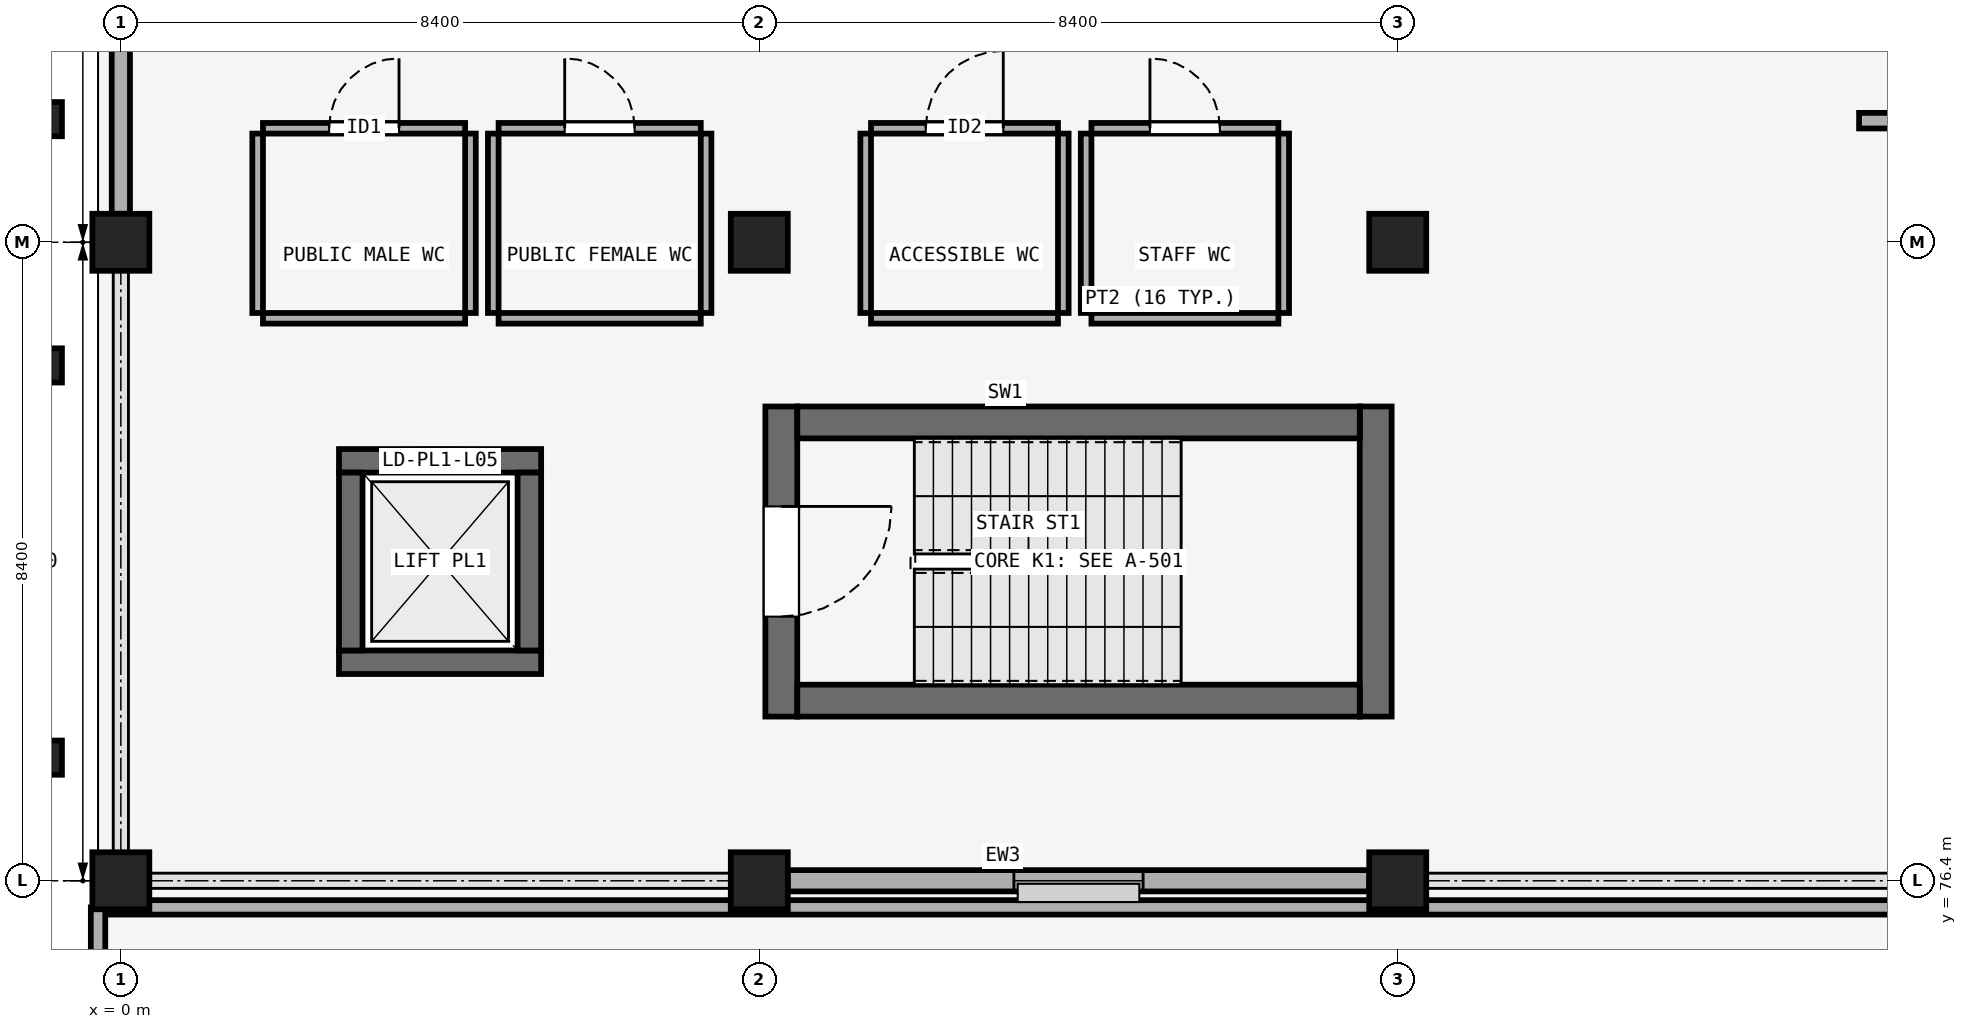
"""IFC4 building model, lengths in metres.
Left out: names, types, materials, properties, quantities, classifications, styles, units other than length and angle.
Written with IfcOpenShell. Run it as: python <this file> out.ifc"""

import sys

from ifc_helpers import new_model, si_unit, direction, frame, frame_2d, origin, origin_2d, place, context, subcontext, project, spatial, rectangle, extrude, element, fill, save


model = new_model("IFC4")
c1 = context("Model", 3, precision=1e-05, world=origin(), true_north=direction((0.0, 1.0)))
c2 = subcontext(c1, "Body", "Model", "MODEL_VIEW")
j1 = project(units=[si_unit("LENGTHUNIT", "METRE"), si_unit("PLANEANGLEUNIT", "RADIAN")], contexts=[c1])
p1 = place(None, origin())
s1 = spatial("IfcSite", under=j1, at=p1, CompositionType="ELEMENT")
p2 = place(p1, origin())
s2 = spatial("IfcBuilding", under=s1, at=p2, CompositionType="ELEMENT")
p3 = place(p2, frame((0.0, 0.0, 23.4)))
s3 = spatial("IfcBuildingStorey", under=s2, at=p3, CompositionType="ELEMENT", Elevation=23.4)
for number, where, z_axis, x_axis in (
    (1, (0.0, 76.4, 0.0), (0.0, 0.0, 1.0), (1.0, 0.0, 0.0)),
    (2, (8.4, 76.4, 0.0), (0.0, 0.0, 1.0), (1.0, 0.0, 0.0)),
    (3, (16.8, 76.4, 0.0), (0.0, 0.0, 1.0), (1.0, 0.0, 0.0)),
    (4, (0.0, 84.8, 0.0), (0.0, 0.0, 1.0), (1.0, 0.0, 0.0)),
    (5, (8.4, 84.8, 0.0), (0.0, 0.0, 1.0), (1.0, 0.0, 0.0)),
    (6, (16.8, 84.8, 0.0), (0.0, 0.0, 1.0), (1.0, 0.0, 0.0)),
):
    element("IfcColumn", number, at=place(p3, frame(where, z_axis=z_axis, x_axis=x_axis)), inside=s3, PredefinedType="COLUMN", context=c2, shape_type="SweptSolid", body=[
        extrude(rectangle(XDim=0.75, YDim=0.75, at=origin_2d()), origin(), (0.0, 0.0, 1.0), 4.5),
    ])
for number, where, z_axis, x_axis in (
    (7, (-1.05, 78.02, 0.0), (0.0, 0.0, 1.0), (0.0, 1.0, 0.0)),
    (8, (-1.05, 83.18, 0.0), (0.0, 0.0, 1.0), (0.0, 1.0, 0.0)),
    (9, (-1.05, 86.42, 0.0), (0.0, 0.0, 1.0), (0.0, 1.0, 0.0)),
):
    element("IfcColumn", number, at=place(p3, frame(where, z_axis=z_axis, x_axis=x_axis)), inside=s3, PredefinedType="PILASTER", context=c2, shape_type="SweptSolid", body=[
        extrude(rectangle(XDim=0.45, YDim=0.55, at=origin_2d()), origin(), (0.0, 0.0, 1.0), 4.5),
    ])
p4 = place(p3, frame((8.775, 76.4, 0.0), z_axis=(0.0, 0.0, 1.0), x_axis=(1.0, 0.0, 0.0)))
e10 = element("IfcWall", 10, at=p4, inside=s3, PredefinedType="SOLIDWALL", context=c2, shape_type="SweptSolid", body=[
    extrude(rectangle(XDim=7.65, YDim=0.28, at=frame_2d((3.825, 0.0))), origin(), (0.0, 0.0, 1.0), 3.45),
])
p5 = place(p4, frame((2.975, 0.0, 0.95)))
e11 = element("IfcOpeningElement", 11, at=p5, cuts=e10, PredefinedType="OPENING", context=c2, shape_type="SweptSolid", body=[
    extrude(rectangle(XDim=1.7, YDim=1.6, at=frame_2d((0.85, 0.8))), frame((0.0, 0.15, 0.0), z_axis=(0.0, -1.0, 0.0), x_axis=(1.0, 0.0, 0.0)), (0.0, 0.0, 1.0), 0.3),
])
p6 = place(p3, frame((0.0, 85.175, 0.0), z_axis=(0.0, 0.0, 1.0), x_axis=(0.0, 1.0, 0.0)))
e12 = element("IfcWall", 12, at=p6, inside=s3, PredefinedType="SOLIDWALL", context=c2, shape_type="SweptSolid", body=[
    extrude(rectangle(XDim=7.65, YDim=0.24, at=frame_2d((3.825, 0.0))), origin(), (0.0, 0.0, 1.0), 3.45),
])
p7 = place(p6, frame((2.9, 0.0, 0.95)))
e13 = element("IfcOpeningElement", 13, at=p7, cuts=e12, PredefinedType="OPENING", context=c2, shape_type="SweptSolid", body=[
    extrude(rectangle(XDim=1.85, YDim=1.85, at=frame_2d((0.925, 0.925))), frame((0.0, 0.13, 0.0), z_axis=(0.0, -1.0, 0.0), x_axis=(1.0, 0.0, 0.0)), (0.0, 0.0, 1.0), 0.26),
])
p8 = place(p3, frame((42.3, 76.05, 0.0), z_axis=(0.0, 0.0, 1.0), x_axis=(-1.0, 0.0, 0.0)))
e14 = element("IfcWall", 14, at=p8, inside=s3, PredefinedType="PARAPET", context=c2, shape_type="SweptSolid", body=[
    extrude(rectangle(XDim=42.6, YDim=0.19, at=frame_2d((21.3, 0.0))), origin(), (0.0, 0.0, 1.0), 0.95),
])
p9 = place(p3, frame((-0.3, 76.05, 0.0), z_axis=(0.0, 0.0, 1.0), x_axis=(0.0, -1.0, 0.0)))
e15 = element("IfcWall", 15, at=p9, inside=s3, PredefinedType="PARAPET", context=c2, shape_type="SweptSolid", body=[
    extrude(rectangle(XDim=8.35, YDim=0.19, at=frame_2d((4.175, 0.0))), origin(), (0.0, 0.0, 1.0), 0.95),
])
p10 = place(p3, frame((8.69, 82.64, 0.0), z_axis=(0.0, 0.0, 1.0), x_axis=(0.0, -1.0, 0.0)))
e16 = element("IfcWall", 16, at=p10, inside=s3, PredefinedType="SHEAR", context=c2, shape_type="SweptSolid", body=[
    extrude(rectangle(XDim=4.08, YDim=0.42, at=frame_2d((2.04, 0.0))), origin(), (0.0, 0.0, 1.0), 4.2),
])
p11 = place(p10, frame((1.315, 0.0, 0.0)))
e17 = element("IfcOpeningElement", 17, at=p11, cuts=e16, PredefinedType="OPENING", context=c2, shape_type="SweptSolid", body=[
    extrude(rectangle(XDim=1.45, YDim=2.2, at=frame_2d((0.725, 1.1))), frame((0.0, 0.22, 0.0), z_axis=(0.0, -1.0, 0.0), x_axis=(1.0, 0.0, 0.0)), (0.0, 0.0, 1.0), 0.44),
])
p12 = place(p3, frame((16.51, 78.56, 0.0), z_axis=(0.0, 0.0, 1.0), x_axis=(0.0, 1.0, 0.0)))
e18 = element("IfcWall", 18, at=p12, inside=s3, PredefinedType="SHEAR", context=c2, shape_type="SweptSolid", body=[
    extrude(rectangle(XDim=4.08, YDim=0.42, at=frame_2d((2.04, 0.0))), origin(), (0.0, 0.0, 1.0), 4.2),
])
for number, where, z_axis, x_axis in (
    (19, (8.9, 78.77, 0.0), (0.0, 0.0, 1.0), (1.0, 0.0, 0.0)),
    (20, (8.9, 82.43, 0.0), (0.0, 0.0, 1.0), (1.0, 0.0, 0.0)),
):
    element("IfcWall", number, at=place(p3, frame(where, z_axis=z_axis, x_axis=x_axis)), inside=s3, PredefinedType="SHEAR", context=c2, shape_type="SweptSolid", body=[
        extrude(rectangle(XDim=7.4, YDim=0.42, at=frame_2d((3.7, 0.0))), origin(), (0.0, 0.0, 1.0), 4.2),
    ])
p13 = place(p3, frame((2.87, 79.275, 0.0), z_axis=(0.0, 0.0, 1.0), x_axis=(1.0, 0.0, 0.0)))
e21 = element("IfcWall", 21, at=p13, inside=s3, PredefinedType="SHEAR", context=c2, shape_type="SweptSolid", body=[
    extrude(rectangle(XDim=2.66, YDim=0.31, at=frame_2d((1.33, 0.0))), origin(), (0.0, 0.0, 1.0), 4.2),
])
p14 = place(p3, frame((2.87, 81.925, 0.0), z_axis=(0.0, 0.0, 1.0), x_axis=(1.0, 0.0, 0.0)))
e22 = element("IfcWall", 22, at=p14, inside=s3, PredefinedType="SHEAR", context=c2, shape_type="SweptSolid", body=[
    extrude(rectangle(XDim=2.66, YDim=0.31, at=frame_2d((1.33, 0.0))), origin(), (0.0, 0.0, 1.0), 4.2),
])
p15 = place(p14, frame((0.78, 0.0, 0.0)))
e23 = element("IfcOpeningElement", 23, at=p15, cuts=e22, PredefinedType="OPENING", context=c2, shape_type="SweptSolid", body=[
    extrude(rectangle(XDim=1.1, YDim=2.2, at=frame_2d((0.55, 1.1))), frame((0.0, 0.165, 0.0), z_axis=(0.0, -1.0, 0.0), x_axis=(1.0, 0.0, 0.0)), (0.0, 0.0, 1.0), 0.33),
])
for number, where, z_axis, x_axis in (
    (24, (3.025, 79.43, 0.0), (0.0, 0.0, 1.0), (0.0, 1.0, 0.0)),
    (25, (5.375, 79.43, 0.0), (0.0, 0.0, 1.0), (0.0, 1.0, 0.0)),
):
    element("IfcWall", number, at=place(p3, frame(where, z_axis=z_axis, x_axis=x_axis)), inside=s3, PredefinedType="SHEAR", context=c2, shape_type="SweptSolid", body=[
        extrude(rectangle(XDim=2.34, YDim=0.31, at=frame_2d((1.17, 0.0))), origin(), (0.0, 0.0, 1.0), 4.2),
    ])
p16 = place(p3, frame((1.87, 86.3, 0.0), z_axis=(0.0, 0.0, 1.0), x_axis=(1.0, 0.0, 0.0)))
e26 = element("IfcWall", 26, at=p16, inside=s3, PredefinedType="PARTITIONING", context=c2, shape_type="SweptSolid", body=[
    extrude(rectangle(XDim=2.66, YDim=0.14, at=frame_2d((1.33, 0.0))), origin(), (0.0, 0.0, 1.0), 4.2),
])
p17 = place(p16, frame((0.87, 0.0, 0.0)))
e27 = element("IfcOpeningElement", 27, at=p17, cuts=e26, PredefinedType="OPENING", context=c2, shape_type="SweptSolid", body=[
    extrude(rectangle(XDim=0.92, YDim=2.12, at=frame_2d((0.46, 1.06))), frame((0.0, 0.08, 0.0), z_axis=(0.0, -1.0, 0.0), x_axis=(1.0, 0.0, 0.0)), (0.0, 0.0, 1.0), 0.16),
])
p18 = place(p3, frame((1.87, 83.8, 0.0), z_axis=(0.0, 0.0, 1.0), x_axis=(1.0, 0.0, 0.0)))
e28 = element("IfcWall", 28, at=p18, inside=s3, PredefinedType="PARTITIONING", context=c2, shape_type="SweptSolid", body=[
    extrude(rectangle(XDim=2.66, YDim=0.14, at=frame_2d((1.33, 0.0))), origin(), (0.0, 0.0, 1.0), 4.2),
])
for number, where, z_axis, x_axis in (
    (29, (1.8, 83.87, 0.0), (0.0, 0.0, 1.0), (0.0, 1.0, 0.0)),
    (30, (4.6, 83.87, 0.0), (0.0, 0.0, 1.0), (0.0, 1.0, 0.0)),
):
    element("IfcWall", number, at=place(p3, frame(where, z_axis=z_axis, x_axis=x_axis)), inside=s3, PredefinedType="PARTITIONING", context=c2, shape_type="SweptSolid", body=[
        extrude(rectangle(XDim=2.36, YDim=0.14, at=frame_2d((1.18, 0.0))), origin(), (0.0, 0.0, 1.0), 3.45),
    ])
p19 = place(p3, frame((4.97, 86.3, 0.0), z_axis=(0.0, 0.0, 1.0), x_axis=(1.0, 0.0, 0.0)))
e31 = element("IfcWall", 31, at=p19, inside=s3, PredefinedType="PARTITIONING", context=c2, shape_type="SweptSolid", body=[
    extrude(rectangle(XDim=2.66, YDim=0.14, at=frame_2d((1.33, 0.0))), origin(), (0.0, 0.0, 1.0), 4.2),
])
p20 = place(p19, frame((0.87, 0.0, 0.0)))
e32 = element("IfcOpeningElement", 32, at=p20, cuts=e31, PredefinedType="OPENING", context=c2, shape_type="SweptSolid", body=[
    extrude(rectangle(XDim=0.92, YDim=2.12, at=frame_2d((0.46, 1.06))), frame((0.0, 0.08, 0.0), z_axis=(0.0, -1.0, 0.0), x_axis=(1.0, 0.0, 0.0)), (0.0, 0.0, 1.0), 0.16),
])
p21 = place(p3, frame((4.97, 83.8, 0.0), z_axis=(0.0, 0.0, 1.0), x_axis=(1.0, 0.0, 0.0)))
e33 = element("IfcWall", 33, at=p21, inside=s3, PredefinedType="PARTITIONING", context=c2, shape_type="SweptSolid", body=[
    extrude(rectangle(XDim=2.66, YDim=0.14, at=frame_2d((1.33, 0.0))), origin(), (0.0, 0.0, 1.0), 4.2),
])
for number, where, z_axis, x_axis in (
    (34, (4.9, 83.87, 0.0), (0.0, 0.0, 1.0), (0.0, 1.0, 0.0)),
    (35, (7.7, 83.87, 0.0), (0.0, 0.0, 1.0), (0.0, 1.0, 0.0)),
):
    element("IfcWall", number, at=place(p3, frame(where, z_axis=z_axis, x_axis=x_axis)), inside=s3, PredefinedType="PARTITIONING", context=c2, shape_type="SweptSolid", body=[
        extrude(rectangle(XDim=2.36, YDim=0.14, at=frame_2d((1.18, 0.0))), origin(), (0.0, 0.0, 1.0), 3.45),
    ])
p22 = place(p3, frame((9.87, 86.3, 0.0), z_axis=(0.0, 0.0, 1.0), x_axis=(1.0, 0.0, 0.0)))
e36 = element("IfcWall", 36, at=p22, inside=s3, PredefinedType="PARTITIONING", context=c2, shape_type="SweptSolid", body=[
    extrude(rectangle(XDim=2.46, YDim=0.14, at=frame_2d((1.23, 0.0))), origin(), (0.0, 0.0, 1.0), 4.2),
])
p23 = place(p22, frame((0.72, 0.0, 0.0)))
e37 = element("IfcOpeningElement", 37, at=p23, cuts=e36, PredefinedType="OPENING", context=c2, shape_type="SweptSolid", body=[
    extrude(rectangle(XDim=1.02, YDim=2.15, at=frame_2d((0.51, 1.075))), frame((0.0, 0.08, 0.0), z_axis=(0.0, -1.0, 0.0), x_axis=(1.0, 0.0, 0.0)), (0.0, 0.0, 1.0), 0.16),
])
p24 = place(p3, frame((9.87, 83.8, 0.0), z_axis=(0.0, 0.0, 1.0), x_axis=(1.0, 0.0, 0.0)))
e38 = element("IfcWall", 38, at=p24, inside=s3, PredefinedType="PARTITIONING", context=c2, shape_type="SweptSolid", body=[
    extrude(rectangle(XDim=2.46, YDim=0.14, at=frame_2d((1.23, 0.0))), origin(), (0.0, 0.0, 1.0), 4.2),
])
for number, where, z_axis, x_axis in (
    (39, (9.8, 83.87, 0.0), (0.0, 0.0, 1.0), (0.0, 1.0, 0.0)),
    (40, (12.4, 83.87, 0.0), (0.0, 0.0, 1.0), (0.0, 1.0, 0.0)),
):
    element("IfcWall", number, at=place(p3, frame(where, z_axis=z_axis, x_axis=x_axis)), inside=s3, PredefinedType="PARTITIONING", context=c2, shape_type="SweptSolid", body=[
        extrude(rectangle(XDim=2.36, YDim=0.14, at=frame_2d((1.18, 0.0))), origin(), (0.0, 0.0, 1.0), 3.45),
    ])
p25 = place(p3, frame((12.77, 86.3, 0.0), z_axis=(0.0, 0.0, 1.0), x_axis=(1.0, 0.0, 0.0)))
e41 = element("IfcWall", 41, at=p25, inside=s3, PredefinedType="PARTITIONING", context=c2, shape_type="SweptSolid", body=[
    extrude(rectangle(XDim=2.46, YDim=0.14, at=frame_2d((1.23, 0.0))), origin(), (0.0, 0.0, 1.0), 4.2),
])
p26 = place(p25, frame((0.77, 0.0, 0.0)))
e42 = element("IfcOpeningElement", 42, at=p26, cuts=e41, PredefinedType="OPENING", context=c2, shape_type="SweptSolid", body=[
    extrude(rectangle(XDim=0.92, YDim=2.12, at=frame_2d((0.46, 1.06))), frame((0.0, 0.08, 0.0), z_axis=(0.0, -1.0, 0.0), x_axis=(1.0, 0.0, 0.0)), (0.0, 0.0, 1.0), 0.16),
])
p27 = place(p3, frame((12.77, 83.8, 0.0), z_axis=(0.0, 0.0, 1.0), x_axis=(1.0, 0.0, 0.0)))
e43 = element("IfcWall", 43, at=p27, inside=s3, PredefinedType="PARTITIONING", context=c2, shape_type="SweptSolid", body=[
    extrude(rectangle(XDim=2.46, YDim=0.14, at=frame_2d((1.23, 0.0))), origin(), (0.0, 0.0, 1.0), 4.2),
])
for number, where, z_axis, x_axis in (
    (44, (12.7, 83.87, 0.0), (0.0, 0.0, 1.0), (0.0, 1.0, 0.0)),
    (45, (15.3, 83.87, 0.0), (0.0, 0.0, 1.0), (0.0, 1.0, 0.0)),
):
    element("IfcWall", number, at=place(p3, frame(where, z_axis=z_axis, x_axis=x_axis)), inside=s3, PredefinedType="PARTITIONING", context=c2, shape_type="SweptSolid", body=[
        extrude(rectangle(XDim=2.36, YDim=0.14, at=frame_2d((1.18, 0.0))), origin(), (0.0, 0.0, 1.0), 3.45),
    ])
p28 = place(p3, frame((22.87, 86.4, 0.0), z_axis=(0.0, 0.0, 1.0), x_axis=(1.0, 0.0, 0.0)))
e46 = element("IfcWall", 46, at=p28, inside=s3, PredefinedType="PARTITIONING", context=c2, shape_type="SweptSolid", body=[
    extrude(rectangle(XDim=6.21, YDim=0.205, at=frame_2d((3.105, 0.0))), origin(), (0.0, 0.0, 1.0), 4.2),
])
p29 = place(p28, frame((3.025, 0.0, 0.0)))
e47 = element("IfcOpeningElement", 47, at=p29, cuts=e46, PredefinedType="OPENING", context=c2, shape_type="SweptSolid", body=[
    extrude(rectangle(XDim=1.36, YDim=2.34, at=frame_2d((0.68, 1.17))), frame((0.0, 0.113, 0.0), z_axis=(0.0, -1.0, 0.0), x_axis=(1.0, 0.0, 0.0)), (0.0, 0.0, 1.0), 0.225),
])
p30 = place(p5, origin())
e48 = element("IfcWindow", 48, at=p30, inside=s3, PartitioningType="DOUBLE_PANEL_VERTICAL", PredefinedType="WINDOW", context=c2, shape_type="SweptSolid", body=[
    extrude(rectangle(XDim=1.7, YDim=1.6, at=frame_2d((0.85, 0.8))), frame((0.0, 0.03, 0.0), z_axis=(0.0, -1.0, 0.0), x_axis=(1.0, 0.0, 0.0)), (0.0, 0.0, 1.0), 0.06),
])
fill(e11, e48)
p31 = place(p11, origin())
e49 = element("IfcDoor", 49, at=p31, inside=s3, OperationType="SINGLE_SWING_LEFT", PredefinedType="DOOR", context=c2, shape_type="SweptSolid", body=[
    extrude(rectangle(XDim=1.45, YDim=2.2, at=frame_2d((0.725, 1.1))), frame((0.0, 0.025, 0.0), z_axis=(0.0, -1.0, 0.0), x_axis=(1.0, 0.0, 0.0)), (0.0, 0.0, 1.0), 0.05),
])
fill(e17, e49)
p32 = place(p15, origin())
e50 = element("IfcDoor", 50, at=p32, inside=s3, OperationType="SLIDING_TO_LEFT", PredefinedType="DOOR", context=c2, shape_type="SweptSolid", body=[
    extrude(rectangle(XDim=1.1, YDim=2.2, at=frame_2d((0.55, 1.1))), frame((0.0, 0.025, 0.0), z_axis=(0.0, -1.0, 0.0), x_axis=(1.0, 0.0, 0.0)), (0.0, 0.0, 1.0), 0.05),
])
fill(e23, e50)
p33 = place(p17, origin())
e51 = element("IfcDoor", 51, at=p33, inside=s3, OperationType="SINGLE_SWING_RIGHT", PredefinedType="DOOR", context=c2, shape_type="SweptSolid", body=[
    extrude(rectangle(XDim=0.92, YDim=2.12, at=frame_2d((0.46, 1.06))), frame((0.0, 0.025, 0.0), z_axis=(0.0, -1.0, 0.0), x_axis=(1.0, 0.0, 0.0)), (0.0, 0.0, 1.0), 0.05),
])
fill(e27, e51)
p34 = place(p20, origin())
e52 = element("IfcDoor", 52, at=p34, inside=s3, OperationType="SINGLE_SWING_LEFT", PredefinedType="DOOR", context=c2, shape_type="SweptSolid", body=[
    extrude(rectangle(XDim=0.92, YDim=2.12, at=frame_2d((0.46, 1.06))), frame((0.0, 0.025, 0.0), z_axis=(0.0, -1.0, 0.0), x_axis=(1.0, 0.0, 0.0)), (0.0, 0.0, 1.0), 0.05),
])
fill(e32, e52)
p35 = place(p23, origin())
e53 = element("IfcDoor", 53, at=p35, inside=s3, OperationType="SINGLE_SWING_RIGHT", PredefinedType="DOOR", context=c2, shape_type="SweptSolid", body=[
    extrude(rectangle(XDim=1.02, YDim=2.15, at=frame_2d((0.51, 1.075))), frame((0.0, 0.025, 0.0), z_axis=(0.0, -1.0, 0.0), x_axis=(1.0, 0.0, 0.0)), (0.0, 0.0, 1.0), 0.05),
])
fill(e37, e53)
p36 = place(p26, origin())
e54 = element("IfcDoor", 54, at=p36, inside=s3, OperationType="SINGLE_SWING_LEFT", PredefinedType="DOOR", context=c2, shape_type="SweptSolid", body=[
    extrude(rectangle(XDim=0.92, YDim=2.12, at=frame_2d((0.46, 1.06))), frame((0.0, 0.025, 0.0), z_axis=(0.0, -1.0, 0.0), x_axis=(1.0, 0.0, 0.0)), (0.0, 0.0, 1.0), 0.05),
])
fill(e42, e54)
save(model, sys.argv[1])
